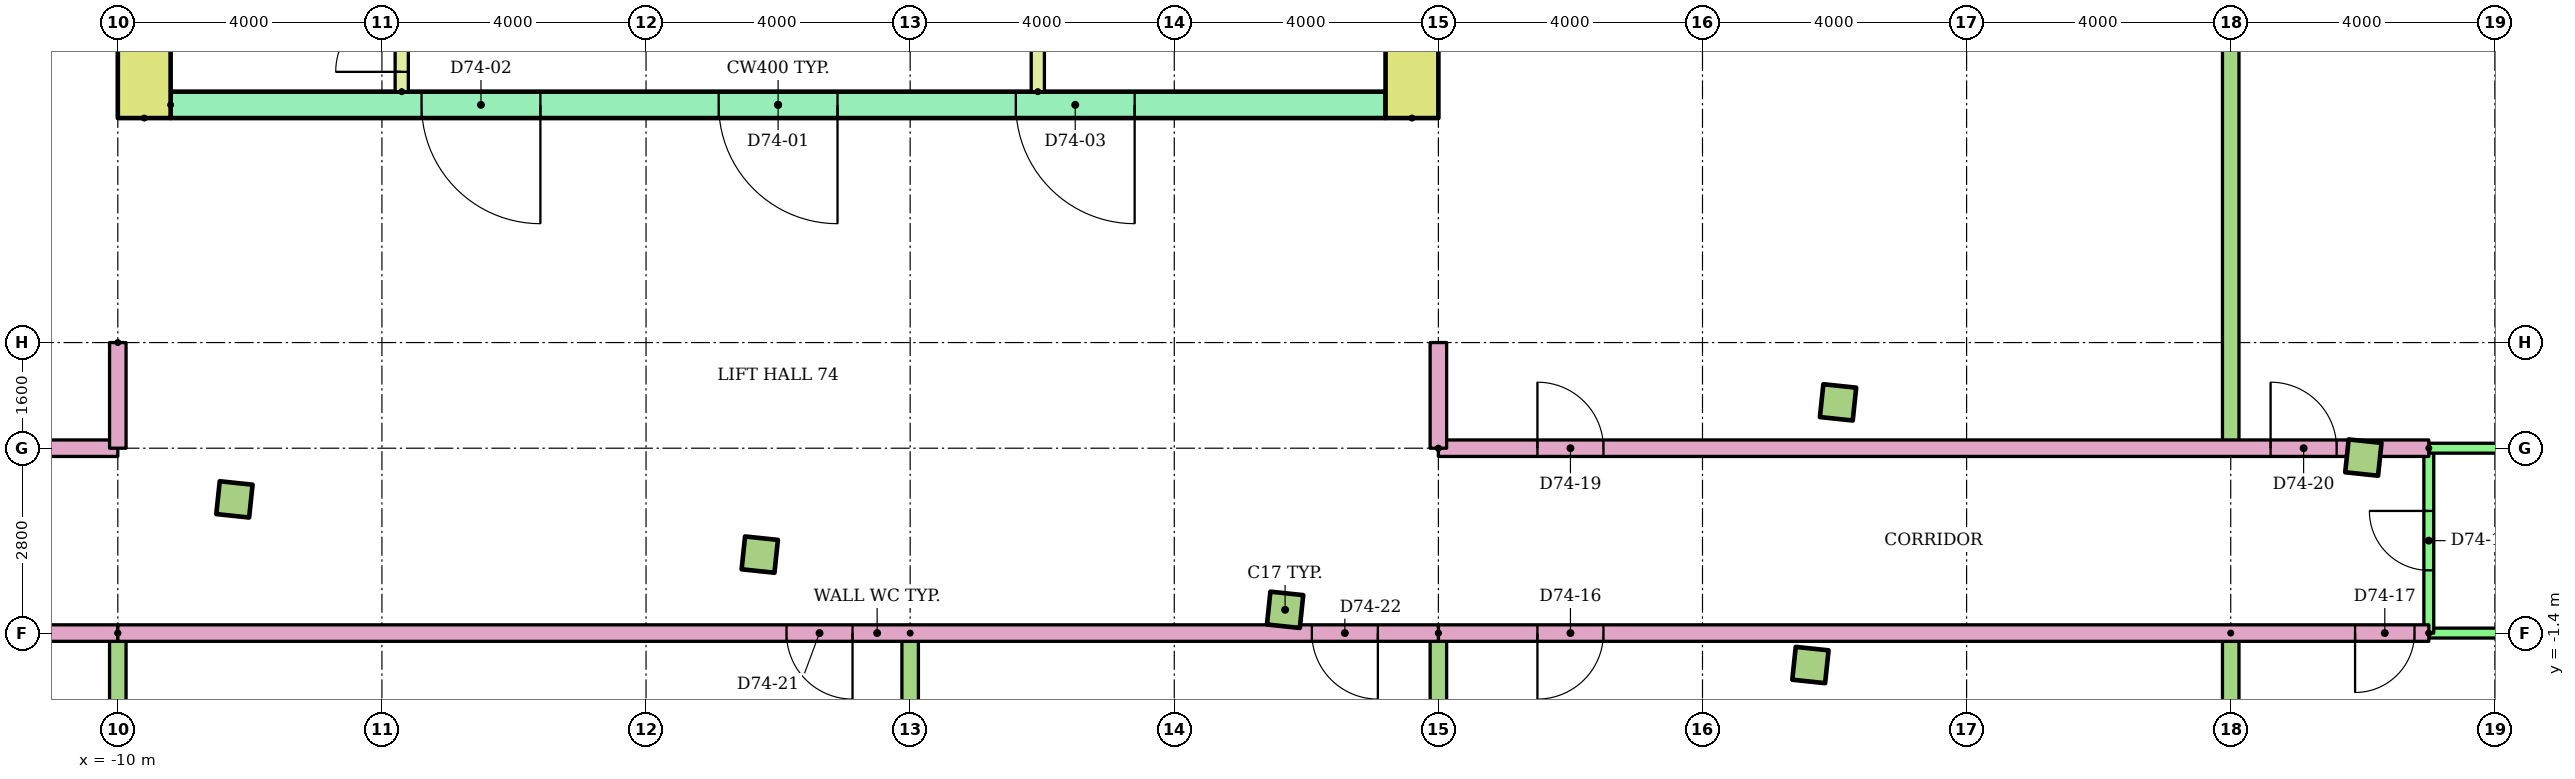
"""IFC4 building model, lengths in metres.
Left out: names, types, materials, properties, quantities, classifications, styles, units other than length and angle.
Written with IfcOpenShell. Run it as: python <this file> out.ifc"""

import sys

from ifc_helpers import new_model, si_unit, direction, frame, frame_2d, origin, origin_2d, place, context, subcontext, project, spatial, rectangle, extrude, element, fill, save


model = new_model("IFC4")
c1 = context("Model", 3, precision=1e-05, world=origin(), true_north=direction((0.0, 1.0)))
c2 = subcontext(c1, "Body", "Model", "MODEL_VIEW")
j1 = project(units=[si_unit("LENGTHUNIT", "METRE"), si_unit("PLANEANGLEUNIT", "RADIAN")], contexts=[c1])
p1 = place(None, origin())
s1 = spatial("IfcSite", under=j1, at=p1, CompositionType="ELEMENT")
p2 = place(p1, origin())
s2 = spatial("IfcBuilding", under=s1, at=p2, CompositionType="ELEMENT")
p3 = place(p2, frame((0.0, 0.0, 281.9)))
s3 = spatial("IfcBuildingStorey", under=s2, at=p3, CompositionType="ELEMENT", Elevation=281.9)
for number, where, z_axis, x_axis in (
    (1, (-8.234, 0.625, 0.0), (0.0, 0.0, 1.0), (0.995, -0.105, 0.0)),
    (2, (-0.278, -0.211, 0.0), (0.0, 0.0, 1.0), (0.995, -0.105, 0.0)),
    (3, (7.678, -1.048, 0.0), (0.0, 0.0, 1.0), (0.995, -0.105, 0.0)),
    (4, (15.635, -1.884, 0.0), (0.0, 0.0, 1.0), (0.995, -0.105, 0.0)),
    (5, (16.053, 2.094, 0.0), (0.0, 0.0, 1.0), (0.995, -0.105, 0.0)),
    (6, (24.009, 1.258, 0.0), (0.0, 0.0, 1.0), (0.995, -0.105, 0.0)),
):
    element("IfcColumn", number, at=place(p3, frame(where, z_axis=z_axis, x_axis=x_axis)), inside=s3, PredefinedType="COLUMN", context=c2, shape_type="SweptSolid", body=[
        extrude(rectangle(XDim=0.5, YDim=0.5, at=origin_2d()), origin(), (0.0, 0.0, 1.0), 9.6),
    ])
for number, where, z_axis, x_axis in (
    (7, (-9.6, 6.4, 0.0), (0.0, 0.0, 1.0), (0.0, 1.0, 0.0)),
    (8, (9.6, 6.4, 0.0), (0.0, 0.0, 1.0), (0.0, 1.0, 0.0)),
):
    element("IfcWall", number, at=place(p3, frame(where, z_axis=z_axis, x_axis=x_axis)), inside=s3, PredefinedType="SHEAR", context=c2, shape_type="SweptSolid", body=[
        extrude(rectangle(XDim=13.6, YDim=0.8, at=frame_2d((6.8, 0.0))), origin(), (0.0, 0.0, 1.0), 9.32),
    ])
p4 = place(p3, frame((-9.2, 6.6, 0.0)))
e9 = element("IfcWall", 9, at=p4, inside=s3, PredefinedType="SHEAR", context=c2, shape_type="SweptSolid", body=[
    extrude(rectangle(XDim=18.4, YDim=0.4, at=frame_2d((9.2, 0.0))), origin(), (0.0, 0.0, 1.0), 9.32),
])
p5 = place(p4, frame((8.3, 0.0, 0.0)))
e10 = element("IfcOpeningElement", 10, at=p5, cuts=e9, PredefinedType="OPENING", context=c2, shape_type="SweptSolid", body=[
    extrude(rectangle(XDim=1.8, YDim=2.1, at=frame_2d((0.9, 1.05))), frame((0.0, 0.21, 0.0), z_axis=(0.0, -1.0, 0.0), x_axis=(1.0, 0.0, 0.0)), (0.0, 0.0, 1.0), 0.42),
])
p6 = place(p4, frame((3.8, 0.0, 0.0)))
e11 = element("IfcOpeningElement", 11, at=p6, cuts=e9, PredefinedType="OPENING", context=c2, shape_type="SweptSolid", body=[
    extrude(rectangle(XDim=1.8, YDim=2.1, at=frame_2d((0.9, 1.05))), frame((0.0, 0.21, 0.0), z_axis=(0.0, -1.0, 0.0), x_axis=(1.0, 0.0, 0.0)), (0.0, 0.0, 1.0), 0.42),
])
p7 = place(p4, frame((12.8, 0.0, 0.0)))
e12 = element("IfcOpeningElement", 12, at=p7, cuts=e9, PredefinedType="OPENING", context=c2, shape_type="SweptSolid", body=[
    extrude(rectangle(XDim=1.8, YDim=2.1, at=frame_2d((0.9, 1.05))), frame((0.0, 0.21, 0.0), z_axis=(0.0, -1.0, 0.0), x_axis=(1.0, 0.0, 0.0)), (0.0, 0.0, 1.0), 0.42),
])
p8 = place(p3, frame((3.933, 6.8, 0.0), z_axis=(0.0, 0.0, 1.0), x_axis=(0.0, 1.0, 0.0)))
e13 = element("IfcWall", 13, at=p8, inside=s3, PredefinedType="PARTITIONING", context=c2, shape_type="SweptSolid", body=[
    extrude(rectangle(XDim=3.3, YDim=0.2, at=frame_2d((1.65, 0.0))), origin(), (0.0, 0.0, 1.0), 9.32),
])
p9 = place(p8, frame((1.1, 0.0, 0.0)))
e14 = element("IfcOpeningElement", 14, at=p9, cuts=e13, PredefinedType="OPENING", context=c2, shape_type="SweptSolid", body=[
    extrude(rectangle(XDim=1.1, YDim=2.1, at=frame_2d((0.55, 1.05))), frame((0.0, 0.11, 0.0), z_axis=(0.0, -1.0, 0.0), x_axis=(1.0, 0.0, 0.0)), (0.0, 0.0, 1.0), 0.22),
])
p10 = place(p3, frame((-5.7, 6.8, 0.0), z_axis=(0.0, 0.0, 1.0), x_axis=(0.0, 1.0, 0.0)))
e15 = element("IfcWall", 15, at=p10, inside=s3, PredefinedType="PARTITIONING", context=c2, shape_type="SweptSolid", body=[
    extrude(rectangle(XDim=1.6, YDim=0.2, at=frame_2d((0.8, 0.0))), origin(), (0.0, 0.0, 1.0), 9.32),
])
p11 = place(p10, frame((0.3, 0.0, 0.0)))
e16 = element("IfcOpeningElement", 16, at=p11, cuts=e15, PredefinedType="OPENING", context=c2, shape_type="SweptSolid", body=[
    extrude(rectangle(XDim=1.0, YDim=2.1, at=frame_2d((0.5, 1.05))), frame((0.0, 0.11, 0.0), z_axis=(0.0, -1.0, 0.0), x_axis=(1.0, 0.0, 0.0)), (0.0, 0.0, 1.0), 0.22),
])
p12 = place(p3, frame((-10.0, -1.4, 0.0), z_axis=(0.0, 0.0, 1.0), x_axis=(-1.0, 0.0, 0.0)))
e17 = element("IfcWall", 17, at=p12, inside=s3, PredefinedType="PARTITIONING", context=c2, shape_type="SweptSolid", body=[
    extrude(rectangle(XDim=12.0, YDim=0.25, at=frame_2d((6.0, 0.0))), origin(), (0.0, 0.0, 1.0), 8.8),
])
p13 = place(p12, frame((1.5, 0.0, 0.0)))
e18 = element("IfcOpeningElement", 18, at=p13, cuts=e17, PredefinedType="OPENING", context=c2, shape_type="SweptSolid", body=[
    extrude(rectangle(XDim=1.0, YDim=2.1, at=frame_2d((0.5, 1.05))), frame((0.0, 0.135, 0.0), z_axis=(0.0, -1.0, 0.0), x_axis=(1.0, 0.0, 0.0)), (0.0, 0.0, 1.0), 0.27),
])
p14 = place(p12, frame((10.7, 0.0, 0.0)))
e19 = element("IfcOpeningElement", 19, at=p14, cuts=e17, PredefinedType="OPENING", context=c2, shape_type="SweptSolid", body=[
    extrude(rectangle(XDim=1.0, YDim=2.1, at=frame_2d((0.5, 1.05))), frame((0.0, 0.135, 0.0), z_axis=(0.0, -1.0, 0.0), x_axis=(1.0, 0.0, 0.0)), (0.0, 0.0, 1.0), 0.27),
])
p15 = place(p3, frame((-10.0, -1.4, 0.0), z_axis=(0.0, 0.0, 1.0), x_axis=(0.0, -1.0, 0.0)))
e20 = element("IfcWall", 20, at=p15, inside=s3, PredefinedType="PARTITIONING", context=c2, shape_type="SweptSolid", body=[
    extrude(rectangle(XDim=12.491, YDim=0.25, at=frame_2d((6.246, 0.0))), origin(), (0.0, 0.0, 1.0), 8.8),
])
p16 = place(p3, frame((-22.0, 1.4, 0.0)))
e21 = element("IfcWall", 21, at=p16, inside=s3, PredefinedType="PARTITIONING", context=c2, shape_type="SweptSolid", body=[
    extrude(rectangle(XDim=12.0, YDim=0.25, at=frame_2d((6.0, 0.0))), origin(), (0.0, 0.0, 1.0), 8.8),
])
p17 = place(p16, frame((9.5, 0.0, 0.0)))
e22 = element("IfcOpeningElement", 22, at=p17, cuts=e21, PredefinedType="OPENING", context=c2, shape_type="SweptSolid", body=[
    extrude(rectangle(XDim=1.0, YDim=2.1, at=frame_2d((0.5, 1.05))), frame((0.0, 0.135, 0.0), z_axis=(0.0, -1.0, 0.0), x_axis=(1.0, 0.0, 0.0)), (0.0, 0.0, 1.0), 0.27),
])
p18 = place(p3, frame((25.0, -1.4, 0.0), z_axis=(0.0, 0.0, 1.0), x_axis=(-1.0, 0.0, 0.0)))
e23 = element("IfcWall", 23, at=p18, inside=s3, PredefinedType="PARTITIONING", context=c2, shape_type="SweptSolid", body=[
    extrude(rectangle(XDim=15.0, YDim=0.25, at=frame_2d((7.5, 0.0))), origin(), (0.0, 0.0, 1.0), 8.8),
])
p19 = place(p18, frame((12.5, 0.0, 0.0)))
e24 = element("IfcOpeningElement", 24, at=p19, cuts=e23, PredefinedType="OPENING", context=c2, shape_type="SweptSolid", body=[
    extrude(rectangle(XDim=1.0, YDim=2.1, at=frame_2d((0.5, 1.05))), frame((0.0, 0.135, 0.0), z_axis=(0.0, -1.0, 0.0), x_axis=(1.0, 0.0, 0.0)), (0.0, 0.0, 1.0), 0.27),
])
p20 = place(p18, frame((0.217, 0.0, 0.0)))
e25 = element("IfcOpeningElement", 25, at=p20, cuts=e23, PredefinedType="OPENING", context=c2, shape_type="SweptSolid", body=[
    extrude(rectangle(XDim=0.9, YDim=2.1, at=frame_2d((0.45, 1.05))), frame((0.0, 0.135, 0.0), z_axis=(0.0, -1.0, 0.0), x_axis=(1.0, 0.0, 0.0)), (0.0, 0.0, 1.0), 0.27),
])
p21 = place(p3, frame((30.798, -1.4, 0.0), z_axis=(0.0, 0.0, 1.0), x_axis=(-1.0, 0.0, 0.0)))
e26 = element("IfcWall", 26, at=p21, inside=s3, PredefinedType="PARTITIONING", context=c2, shape_type="SweptSolid", body=[
    extrude(rectangle(XDim=5.798, YDim=0.15, at=frame_2d((2.899, 0.0))), origin(), (0.0, 0.0, 1.0), 8.8),
])
p22 = place(p3, frame((25.0, -1.4, 0.0), z_axis=(0.0, 0.0, 1.0), x_axis=(0.0, 1.0, 0.0)))
e27 = element("IfcWall", 27, at=p22, inside=s3, PredefinedType="PARTITIONING", context=c2, shape_type="SweptSolid", body=[
    extrude(rectangle(XDim=2.8, YDim=0.15, at=frame_2d((1.4, 0.0))), origin(), (0.0, 0.0, 1.0), 8.8),
])
p23 = place(p22, frame((0.95, 0.0, 0.0)))
e28 = element("IfcOpeningElement", 28, at=p23, cuts=e27, PredefinedType="OPENING", context=c2, shape_type="SweptSolid", body=[
    extrude(rectangle(XDim=0.9, YDim=2.1, at=frame_2d((0.45, 1.05))), frame((0.0, 0.085, 0.0), z_axis=(0.0, -1.0, 0.0), x_axis=(1.0, 0.0, 0.0)), (0.0, 0.0, 1.0), 0.17),
])
p24 = place(p3, frame((10.0, -1.4, 0.0), z_axis=(0.0, 0.0, 1.0), x_axis=(0.0, -1.0, 0.0)))
e29 = element("IfcWall", 29, at=p24, inside=s3, PredefinedType="PARTITIONING", context=c2, shape_type="SweptSolid", body=[
    extrude(rectangle(XDim=14.593, YDim=0.25, at=frame_2d((7.297, 0.0))), origin(), (0.0, 0.0, 1.0), 8.8),
])
p25 = place(p3, frame((22.0, -1.4, 0.0), z_axis=(0.0, 0.0, 1.0), x_axis=(0.0, -1.0, 0.0)))
e30 = element("IfcWall", 30, at=p25, inside=s3, PredefinedType="PARTITIONING", context=c2, shape_type="SweptSolid", body=[
    extrude(rectangle(XDim=15.854, YDim=0.25, at=frame_2d((7.927, 0.0))), origin(), (0.0, 0.0, 1.0), 8.8),
])
p26 = place(p3, frame((10.0, 1.4, 0.0)))
e31 = element("IfcWall", 31, at=p26, inside=s3, PredefinedType="PARTITIONING", context=c2, shape_type="SweptSolid", body=[
    extrude(rectangle(XDim=15.0, YDim=0.25, at=frame_2d((7.5, 0.0))), origin(), (0.0, 0.0, 1.0), 8.8),
])
p27 = place(p26, frame((1.5, 0.0, 0.0)))
e32 = element("IfcOpeningElement", 32, at=p27, cuts=e31, PredefinedType="OPENING", context=c2, shape_type="SweptSolid", body=[
    extrude(rectangle(XDim=1.0, YDim=2.1, at=frame_2d((0.5, 1.05))), frame((0.0, 0.135, 0.0), z_axis=(0.0, -1.0, 0.0), x_axis=(1.0, 0.0, 0.0)), (0.0, 0.0, 1.0), 0.27),
])
p28 = place(p26, frame((12.604, 0.0, 0.0)))
e33 = element("IfcOpeningElement", 33, at=p28, cuts=e31, PredefinedType="OPENING", context=c2, shape_type="SweptSolid", body=[
    extrude(rectangle(XDim=1.0, YDim=2.1, at=frame_2d((0.5, 1.05))), frame((0.0, 0.135, 0.0), z_axis=(0.0, -1.0, 0.0), x_axis=(1.0, 0.0, 0.0)), (0.0, 0.0, 1.0), 0.27),
])
p29 = place(p3, frame((25.0, 1.4, 0.0)))
e34 = element("IfcWall", 34, at=p29, inside=s3, PredefinedType="PARTITIONING", context=c2, shape_type="SweptSolid", body=[
    extrude(rectangle(XDim=6.093, YDim=0.15, at=frame_2d((3.046, 0.0))), origin(), (0.0, 0.0, 1.0), 8.8),
])
p30 = place(p3, frame((22.0, 18.584, 0.0), z_axis=(0.0, 0.0, 1.0), x_axis=(0.0, -1.0, 0.0)))
e35 = element("IfcWall", 35, at=p30, inside=s3, PredefinedType="PARTITIONING", context=c2, shape_type="SweptSolid", body=[
    extrude(rectangle(XDim=17.184, YDim=0.25, at=frame_2d((8.592, 0.0))), origin(), (0.0, 0.0, 1.0), 8.8),
])
p31 = place(p3, frame((2.0, -1.4, 0.0), z_axis=(0.0, 0.0, 1.0), x_axis=(0.0, -1.0, 0.0)))
e36 = element("IfcWall", 36, at=p31, inside=s3, PredefinedType="PARTITIONING", context=c2, shape_type="SweptSolid", body=[
    extrude(rectangle(XDim=13.752, YDim=0.25, at=frame_2d((6.876, 0.0))), origin(), (0.0, 0.0, 1.0), 8.8),
])
p32 = place(p3, frame((10.0, -1.4, 0.0), z_axis=(0.0, 0.0, 1.0), x_axis=(-1.0, 0.0, 0.0)))
e37 = element("IfcWall", 37, at=p32, inside=s3, PredefinedType="PARTITIONING", context=c2, shape_type="SweptSolid", body=[
    extrude(rectangle(XDim=20.0, YDim=0.25, at=frame_2d((10.0, 0.0))), origin(), (0.0, 0.0, 1.0), 8.8),
])
p33 = place(p32, frame((8.873, 0.0, 0.0)))
e38 = element("IfcOpeningElement", 38, at=p33, cuts=e37, PredefinedType="OPENING", context=c2, shape_type="SweptSolid", body=[
    extrude(rectangle(XDim=1.0, YDim=2.1, at=frame_2d((0.5, 1.05))), frame((0.0, 0.135, 0.0), z_axis=(0.0, -1.0, 0.0), x_axis=(1.0, 0.0, 0.0)), (0.0, 0.0, 1.0), 0.27),
])
p34 = place(p32, frame((0.917, 0.0, 0.0)))
e39 = element("IfcOpeningElement", 39, at=p34, cuts=e37, PredefinedType="OPENING", context=c2, shape_type="SweptSolid", body=[
    extrude(rectangle(XDim=1.0, YDim=2.1, at=frame_2d((0.5, 1.05))), frame((0.0, 0.135, 0.0), z_axis=(0.0, -1.0, 0.0), x_axis=(1.0, 0.0, 0.0)), (0.0, 0.0, 1.0), 0.27),
])
for number, where, z_axis, x_axis in (
    (40, (-10.0, 3.0, 0.0), (0.0, 0.0, 1.0), (0.0, -1.0, 0.0)),
    (41, (10.0, 1.4, 0.0), (0.0, 0.0, 1.0), (0.0, 1.0, 0.0)),
):
    element("IfcWall", number, at=place(p3, frame(where, z_axis=z_axis, x_axis=x_axis)), inside=s3, PredefinedType="PARTITIONING", context=c2, shape_type="SweptSolid", body=[
        extrude(rectangle(XDim=1.6, YDim=0.25, at=frame_2d((0.8, 0.0))), origin(), (0.0, 0.0, 1.0), 8.8),
    ])
p35 = place(p5, frame((1.8, 0.0, 0.0), z_axis=(0.0, 0.0, 1.0), x_axis=(-1.0, 0.0, 0.0)))
e42 = element("IfcDoor", 42, at=p35, inside=s3, OperationType="DOUBLE_DOOR_SINGLE_SWING", PredefinedType="DOOR", context=c2, shape_type="SweptSolid", body=[
    extrude(rectangle(XDim=1.8, YDim=2.1, at=frame_2d((0.9, 1.05))), frame((0.0, 0.025, 0.0), z_axis=(0.0, -1.0, 0.0), x_axis=(1.0, 0.0, 0.0)), (0.0, 0.0, 1.0), 0.05),
])
fill(e10, e42)
p36 = place(p6, frame((1.8, 0.0, 0.0), z_axis=(0.0, 0.0, 1.0), x_axis=(-1.0, 0.0, 0.0)))
e43 = element("IfcDoor", 43, at=p36, inside=s3, OperationType="DOUBLE_DOOR_SINGLE_SWING", PredefinedType="DOOR", context=c2, shape_type="SweptSolid", body=[
    extrude(rectangle(XDim=1.8, YDim=2.1, at=frame_2d((0.9, 1.05))), frame((0.0, 0.025, 0.0), z_axis=(0.0, -1.0, 0.0), x_axis=(1.0, 0.0, 0.0)), (0.0, 0.0, 1.0), 0.05),
])
fill(e11, e43)
p37 = place(p7, frame((1.8, 0.0, 0.0), z_axis=(0.0, 0.0, 1.0), x_axis=(-1.0, 0.0, 0.0)))
e44 = element("IfcDoor", 44, at=p37, inside=s3, OperationType="DOUBLE_DOOR_SINGLE_SWING", PredefinedType="DOOR", context=c2, shape_type="SweptSolid", body=[
    extrude(rectangle(XDim=1.8, YDim=2.1, at=frame_2d((0.9, 1.05))), frame((0.0, 0.025, 0.0), z_axis=(0.0, -1.0, 0.0), x_axis=(1.0, 0.0, 0.0)), (0.0, 0.0, 1.0), 0.05),
])
fill(e12, e44)
p38 = place(p11, origin())
e45 = element("IfcDoor", 45, at=p38, inside=s3, OperationType="SINGLE_SWING_LEFT", PredefinedType="DOOR", context=c2, shape_type="SweptSolid", body=[
    extrude(rectangle(XDim=1.0, YDim=2.1, at=frame_2d((0.5, 1.05))), frame((0.0, 0.025, 0.0), z_axis=(0.0, -1.0, 0.0), x_axis=(1.0, 0.0, 0.0)), (0.0, 0.0, 1.0), 0.05),
])
fill(e16, e45)
p39 = place(p19, origin())
e46 = element("IfcDoor", 46, at=p39, inside=s3, OperationType="SINGLE_SWING_RIGHT", PredefinedType="DOOR", context=c2, shape_type="SweptSolid", body=[
    extrude(rectangle(XDim=1.0, YDim=2.1, at=frame_2d((0.5, 1.05))), frame((0.0, 0.025, 0.0), z_axis=(0.0, -1.0, 0.0), x_axis=(1.0, 0.0, 0.0)), (0.0, 0.0, 1.0), 0.05),
])
fill(e24, e46)
p40 = place(p20, origin())
e47 = element("IfcDoor", 47, at=p40, inside=s3, OperationType="SINGLE_SWING_RIGHT", PredefinedType="DOOR", context=c2, shape_type="SweptSolid", body=[
    extrude(rectangle(XDim=0.9, YDim=2.1, at=frame_2d((0.45, 1.05))), frame((0.0, 0.025, 0.0), z_axis=(0.0, -1.0, 0.0), x_axis=(1.0, 0.0, 0.0)), (0.0, 0.0, 1.0), 0.05),
])
fill(e25, e47)
p41 = place(p23, origin())
e48 = element("IfcDoor", 48, at=p41, inside=s3, OperationType="SINGLE_SWING_RIGHT", PredefinedType="DOOR", context=c2, shape_type="SweptSolid", body=[
    extrude(rectangle(XDim=0.9, YDim=2.1, at=frame_2d((0.45, 1.05))), frame((0.0, 0.025, 0.0), z_axis=(0.0, -1.0, 0.0), x_axis=(1.0, 0.0, 0.0)), (0.0, 0.0, 1.0), 0.05),
])
fill(e28, e48)
p42 = place(p27, origin())
e49 = element("IfcDoor", 49, at=p42, inside=s3, OperationType="SINGLE_SWING_LEFT", PredefinedType="DOOR", context=c2, shape_type="SweptSolid", body=[
    extrude(rectangle(XDim=1.0, YDim=2.1, at=frame_2d((0.5, 1.05))), frame((0.0, 0.025, 0.0), z_axis=(0.0, -1.0, 0.0), x_axis=(1.0, 0.0, 0.0)), (0.0, 0.0, 1.0), 0.05),
])
fill(e32, e49)
p43 = place(p28, origin())
e50 = element("IfcDoor", 50, at=p43, inside=s3, OperationType="SINGLE_SWING_LEFT", PredefinedType="DOOR", context=c2, shape_type="SweptSolid", body=[
    extrude(rectangle(XDim=1.0, YDim=2.1, at=frame_2d((0.5, 1.05))), frame((0.0, 0.025, 0.0), z_axis=(0.0, -1.0, 0.0), x_axis=(1.0, 0.0, 0.0)), (0.0, 0.0, 1.0), 0.05),
])
fill(e33, e50)
p44 = place(p33, origin())
e51 = element("IfcDoor", 51, at=p44, inside=s3, OperationType="SINGLE_SWING_LEFT", PredefinedType="DOOR", context=c2, shape_type="SweptSolid", body=[
    extrude(rectangle(XDim=1.0, YDim=2.1, at=frame_2d((0.5, 1.05))), frame((0.0, 0.025, 0.0), z_axis=(0.0, -1.0, 0.0), x_axis=(1.0, 0.0, 0.0)), (0.0, 0.0, 1.0), 0.05),
])
fill(e38, e51)
p45 = place(p34, origin())
e52 = element("IfcDoor", 52, at=p45, inside=s3, OperationType="SINGLE_SWING_LEFT", PredefinedType="DOOR", context=c2, shape_type="SweptSolid", body=[
    extrude(rectangle(XDim=1.0, YDim=2.1, at=frame_2d((0.5, 1.05))), frame((0.0, 0.025, 0.0), z_axis=(0.0, -1.0, 0.0), x_axis=(1.0, 0.0, 0.0)), (0.0, 0.0, 1.0), 0.05),
])
fill(e39, e52)
save(model, sys.argv[1])
